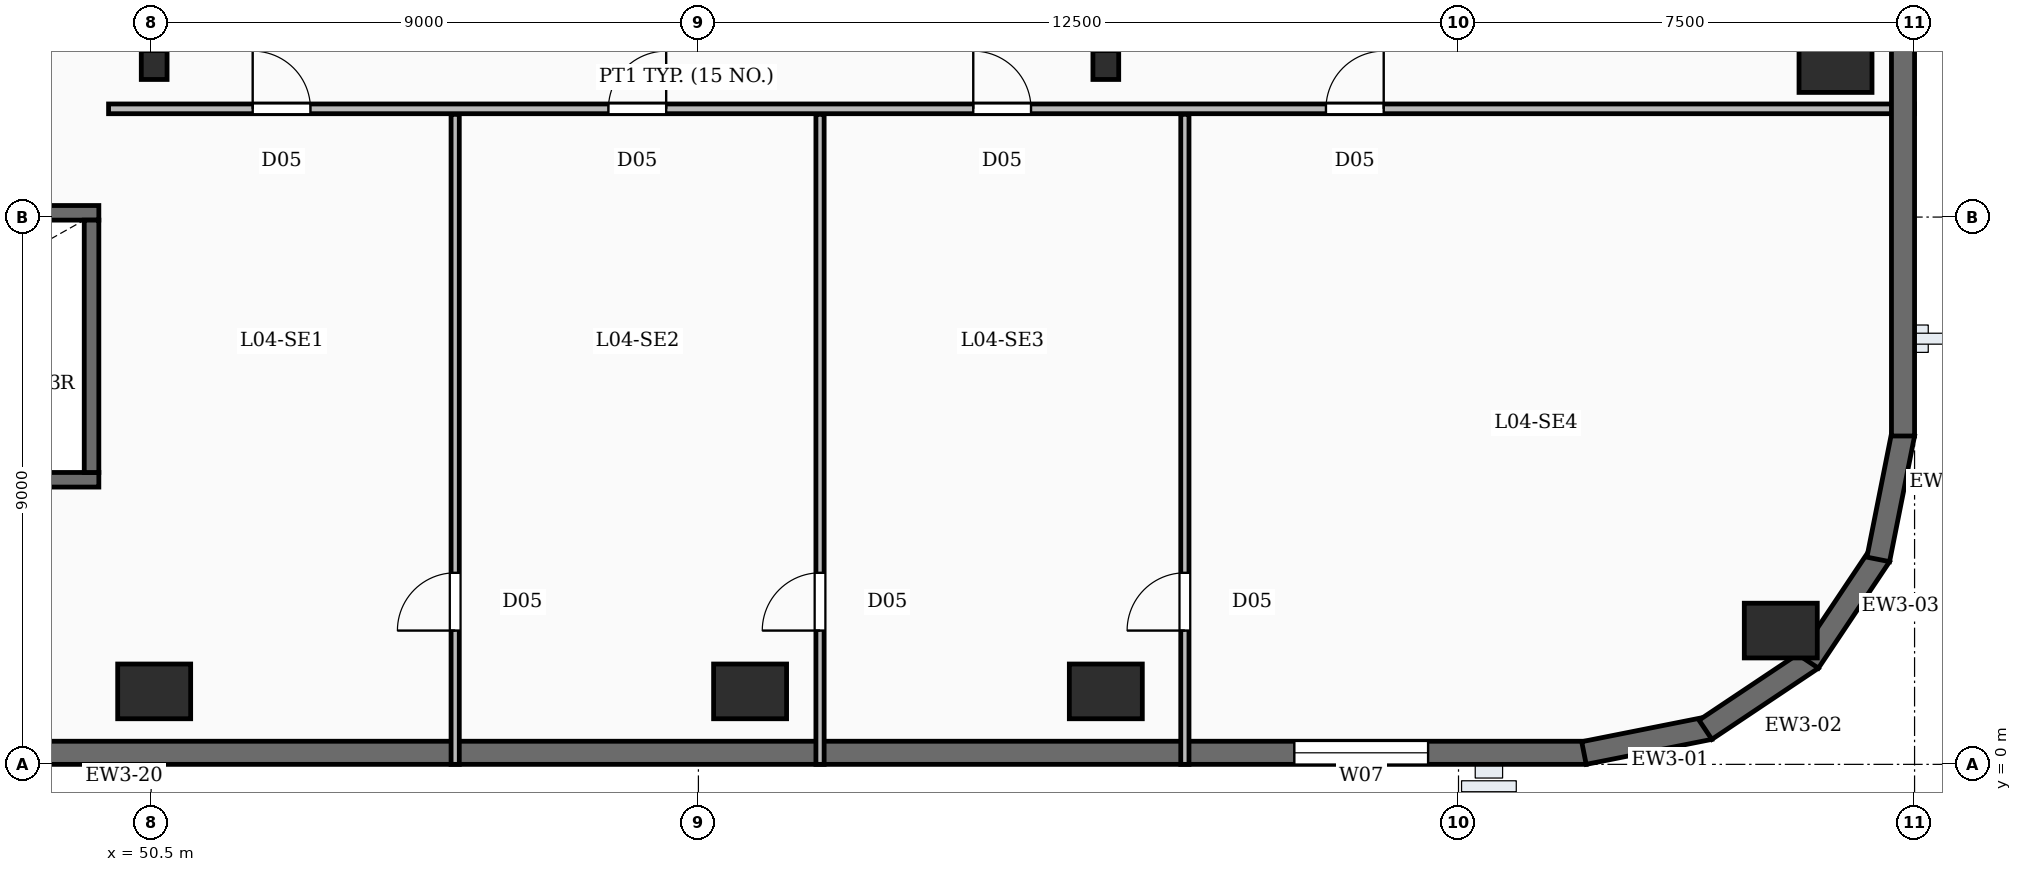
"""IFC4 building model, lengths in metres.
Left out: names, types, materials, properties, quantities, classifications, styles, units other than length and angle.
Written with IfcOpenShell. Run it as: python <this file> out.ifc"""

import sys

from ifc_helpers import new_model, si_unit, direction, frame, frame_2d, origin, origin_2d, place, context, subcontext, project, spatial, rectangle, i_section, extrude, element, fill, save


model = new_model("IFC4")
c1 = context("Model", 3, precision=1e-05, world=origin(), true_north=direction((0.0, 1.0)))
c2 = subcontext(c1, "Body", "Model", "MODEL_VIEW")
j1 = project(units=[si_unit("LENGTHUNIT", "METRE"), si_unit("PLANEANGLEUNIT", "RADIAN")], contexts=[c1])
p1 = place(None, origin())
s1 = spatial("IfcSite", under=j1, at=p1, CompositionType="ELEMENT")
p2 = place(p1, origin())
s2 = spatial("IfcBuilding", under=s1, at=p2, CompositionType="ELEMENT")
p3 = place(p2, frame((0.0, 0.0, 23.0)))
s3 = spatial("IfcBuildingStorey", under=s2, at=p3, CompositionType="ELEMENT", Elevation=23.0)
for number, where, z_axis, x_axis in (
    (1, (50.55, 1.2, -0.35), (0.0, 0.0, 1.0), (1.0, 0.0, 0.0)),
    (2, (60.35, 1.2, -0.35), (0.0, 0.0, 1.0), (1.0, 0.0, 0.0)),
    (3, (66.2, 1.2, -0.35), (0.0, 0.0, 1.0), (1.0, 0.0, 0.0)),
    (4, (77.3, 2.2, -0.35), (0.0, 0.0, 1.0), (1.0, 0.0, 0.0)),
    (5, (78.2, 11.5, -0.35), (0.0, 0.0, 1.0), (1.0, 0.0, 0.0)),
):
    element("IfcColumn", number, at=place(p3, frame(where, z_axis=z_axis, x_axis=x_axis)), inside=s3, PredefinedType="COLUMN", context=c2, shape_type="SweptSolid", body=[
        extrude(rectangle(XDim=1.2, YDim=0.9, at=origin_2d()), origin(), (0.0, 0.0, 1.0), 5.0),
    ])
for number, where, z_axis, x_axis in (
    (6, (50.55, 11.5, -0.35), (0.0, 0.0, 1.0), (1.0, 0.0, 0.0)),
    (7, (66.2, 11.5, -0.35), (0.0, 0.0, 1.0), (1.0, 0.0, 0.0)),
):
    element("IfcColumn", number, at=place(p3, frame(where, z_axis=z_axis, x_axis=x_axis)), inside=s3, PredefinedType="COLUMN", context=c2, shape_type="SweptSolid", body=[
        extrude(i_section(OverallWidth=0.424, OverallDepth=0.474, WebThickness=0.048, FlangeThickness=0.077, FilletRadius=0.02, at=origin_2d()), origin(), (0.0, 0.0, 1.0), 5.0),
    ])
for number, where, z_axis, x_axis in (
    (8, (76.129, 0.597, 0.0), (0.0, 0.0, 1.0), (-0.981, -0.195, 0.0)),
    (9, (77.813, 1.74, 0.0), (0.0, 0.0, 1.0), (-0.832, -0.556, 0.0)),
    (10, (78.931, 3.439, 0.0), (0.0, 0.0, 1.0), (-0.556, -0.832, 0.0)),
    (11, (79.314, 5.437, 0.0), (0.0, 0.0, 1.0), (-0.195, -0.981, 0.0)),
):
    element("IfcWall", number, at=place(p3, frame(where, z_axis=z_axis, x_axis=x_axis)), inside=s3, PredefinedType="SOLIDWALL", context=c2, shape_type="SweptSolid", body=[
        extrude(rectangle(XDim=2.107, YDim=0.38, at=frame_2d((1.053, 0.0))), origin(), (0.0, 0.0, 1.0), 4.65),
    ])
p4 = place(p3, frame((79.31, 49.1, 0.0), z_axis=(0.0, 0.0, 1.0), x_axis=(0.0, -1.0, 0.0)))
e12 = element("IfcWall", 12, at=p4, inside=s3, PredefinedType="SOLIDWALL", context=c2, shape_type="SweptSolid", body=[
    extrude(rectangle(XDim=43.7, YDim=0.38, at=frame_2d((21.85, 0.0))), origin(), (0.0, 0.0, 1.0), 4.65),
])
p5 = place(p4, frame((2.6, 0.0, 0.95)))
e13 = element("IfcOpeningElement", 13, at=p5, cuts=e12, PredefinedType="OPENING", context=c2, shape_type="SweptSolid", body=[
    extrude(rectangle(XDim=2.2, YDim=2.5, at=frame_2d((1.1, 1.25))), frame((0.0, 0.2, 0.0), z_axis=(0.0, -1.0, 0.0), x_axis=(1.0, 0.0, 0.0)), (0.0, 0.0, 1.0), 0.4),
])
p6 = place(p4, frame((8.0, 0.0, 0.95)))
e14 = element("IfcOpeningElement", 14, at=p6, cuts=e12, PredefinedType="OPENING", context=c2, shape_type="SweptSolid", body=[
    extrude(rectangle(XDim=2.2, YDim=2.5, at=frame_2d((1.1, 1.25))), frame((0.0, 0.2, 0.0), z_axis=(0.0, -1.0, 0.0), x_axis=(1.0, 0.0, 0.0)), (0.0, 0.0, 1.0), 0.4),
])
p7 = place(p4, frame((18.8, 0.0, 0.95)))
e15 = element("IfcOpeningElement", 15, at=p7, cuts=e12, PredefinedType="OPENING", context=c2, shape_type="SweptSolid", body=[
    extrude(rectangle(XDim=2.2, YDim=2.5, at=frame_2d((1.1, 1.25))), frame((0.0, 0.2, 0.0), z_axis=(0.0, -1.0, 0.0), x_axis=(1.0, 0.0, 0.0)), (0.0, 0.0, 1.0), 0.4),
])
p8 = place(p4, frame((24.2, 0.0, 0.95)))
e16 = element("IfcOpeningElement", 16, at=p8, cuts=e12, PredefinedType="OPENING", context=c2, shape_type="SweptSolid", body=[
    extrude(rectangle(XDim=2.2, YDim=2.5, at=frame_2d((1.1, 1.25))), frame((0.0, 0.2, 0.0), z_axis=(0.0, -1.0, 0.0), x_axis=(1.0, 0.0, 0.0)), (0.0, 0.0, 1.0), 0.4),
])
p9 = place(p4, frame((29.6, 0.0, 0.95)))
e17 = element("IfcOpeningElement", 17, at=p9, cuts=e12, PredefinedType="OPENING", context=c2, shape_type="SweptSolid", body=[
    extrude(rectangle(XDim=2.2, YDim=2.5, at=frame_2d((1.1, 1.25))), frame((0.0, 0.2, 0.0), z_axis=(0.0, -1.0, 0.0), x_axis=(1.0, 0.0, 0.0)), (0.0, 0.0, 1.0), 0.4),
])
p10 = place(p3, frame((74.1, 0.19, 0.0), z_axis=(0.0, 0.0, 1.0), x_axis=(-1.0, 0.0, 0.0)))
e18 = element("IfcWall", 18, at=p10, inside=s3, PredefinedType="SOLIDWALL", context=c2, shape_type="SweptSolid", body=[
    extrude(rectangle(XDim=68.7, YDim=0.38, at=frame_2d((34.35, 0.0))), origin(), (0.0, 0.0, 1.0), 4.65),
])
p11 = place(p10, frame((2.6, 0.0, 0.95)))
e19 = element("IfcOpeningElement", 19, at=p11, cuts=e18, PredefinedType="OPENING", context=c2, shape_type="SweptSolid", body=[
    extrude(rectangle(XDim=2.2, YDim=2.5, at=frame_2d((1.1, 1.25))), frame((0.0, 0.2, 0.0), z_axis=(0.0, -1.0, 0.0), x_axis=(1.0, 0.0, 0.0)), (0.0, 0.0, 1.0), 0.4),
])
p12 = place(p10, frame((29.6, 0.0, 0.95)))
e20 = element("IfcOpeningElement", 20, at=p12, cuts=e18, PredefinedType="OPENING", context=c2, shape_type="SweptSolid", body=[
    extrude(rectangle(XDim=2.2, YDim=2.5, at=frame_2d((1.1, 1.25))), frame((0.0, 0.2, 0.0), z_axis=(0.0, -1.0, 0.0), x_axis=(1.0, 0.0, 0.0)), (0.0, 0.0, 1.0), 0.4),
])
p13 = place(p10, frame((40.4, 0.0, 0.95)))
e21 = element("IfcOpeningElement", 21, at=p13, cuts=e18, PredefinedType="OPENING", context=c2, shape_type="SweptSolid", body=[
    extrude(rectangle(XDim=2.2, YDim=2.5, at=frame_2d((1.1, 1.25))), frame((0.0, 0.2, 0.0), z_axis=(0.0, -1.0, 0.0), x_axis=(1.0, 0.0, 0.0)), (0.0, 0.0, 1.0), 0.4),
])
p14 = place(p10, frame((45.8, 0.0, 0.95)))
e22 = element("IfcOpeningElement", 22, at=p14, cuts=e18, PredefinedType="OPENING", context=c2, shape_type="SweptSolid", body=[
    extrude(rectangle(XDim=2.2, YDim=2.5, at=frame_2d((1.1, 1.25))), frame((0.0, 0.2, 0.0), z_axis=(0.0, -1.0, 0.0), x_axis=(1.0, 0.0, 0.0)), (0.0, 0.0, 1.0), 0.4),
])
p15 = place(p10, frame((51.2, 0.0, 0.95)))
e23 = element("IfcOpeningElement", 23, at=p15, cuts=e18, PredefinedType="OPENING", context=c2, shape_type="SweptSolid", body=[
    extrude(rectangle(XDim=2.2, YDim=2.5, at=frame_2d((1.1, 1.25))), frame((0.0, 0.2, 0.0), z_axis=(0.0, -1.0, 0.0), x_axis=(1.0, 0.0, 0.0)), (0.0, 0.0, 1.0), 0.4),
])
p16 = place(p10, frame((56.6, 0.0, 0.95)))
e24 = element("IfcOpeningElement", 24, at=p16, cuts=e18, PredefinedType="OPENING", context=c2, shape_type="SweptSolid", body=[
    extrude(rectangle(XDim=2.2, YDim=2.5, at=frame_2d((1.1, 1.25))), frame((0.0, 0.2, 0.0), z_axis=(0.0, -1.0, 0.0), x_axis=(1.0, 0.0, 0.0)), (0.0, 0.0, 1.0), 0.4),
])
p17 = place(p10, frame((62.0, 0.0, 0.95)))
e25 = element("IfcOpeningElement", 25, at=p17, cuts=e18, PredefinedType="OPENING", context=c2, shape_type="SweptSolid", body=[
    extrude(rectangle(XDim=2.2, YDim=2.5, at=frame_2d((1.1, 1.25))), frame((0.0, 0.2, 0.0), z_axis=(0.0, -1.0, 0.0), x_axis=(1.0, 0.0, 0.0)), (0.0, 0.0, 1.0), 0.4),
])
p18 = place(p3, frame((39.76, 9.07, 0.0), z_axis=(0.0, 0.0, 1.0), x_axis=(1.0, 0.0, 0.0)))
e26 = element("IfcWall", 26, at=p18, inside=s3, PredefinedType="SOLIDWALL", context=c2, shape_type="SweptSolid", body=[
    extrude(rectangle(XDim=9.88, YDim=0.24, at=frame_2d((4.94, 0.0))), origin(), (0.0, 0.0, 1.0), 4.65),
])
p19 = place(p18, frame((0.69, 0.0, 0.0)))
e27 = element("IfcOpeningElement", 27, at=p19, cuts=e26, PredefinedType="OPENING", context=c2, shape_type="SweptSolid", body=[
    extrude(rectangle(XDim=1.1, YDim=2.15, at=frame_2d((0.55, 1.075))), frame((0.0, 0.13, 0.0), z_axis=(0.0, -1.0, 0.0), x_axis=(1.0, 0.0, 0.0)), (0.0, 0.0, 1.0), 0.26),
])
p20 = place(p3, frame((39.76, 4.68, 0.0), z_axis=(0.0, 0.0, 1.0), x_axis=(1.0, 0.0, 0.0)))
e28 = element("IfcWall", 28, at=p20, inside=s3, PredefinedType="SOLIDWALL", context=c2, shape_type="SweptSolid", body=[
    extrude(rectangle(XDim=9.88, YDim=0.24, at=frame_2d((4.94, 0.0))), origin(), (0.0, 0.0, 1.0), 4.65),
])
p21 = place(p3, frame((49.52, 4.8, 0.0), z_axis=(0.0, 0.0, 1.0), x_axis=(0.0, 1.0, 0.0)))
e29 = element("IfcWall", 29, at=p21, inside=s3, PredefinedType="SOLIDWALL", context=c2, shape_type="SweptSolid", body=[
    extrude(rectangle(XDim=4.15, YDim=0.24, at=frame_2d((2.075, 0.0))), origin(), (0.0, 0.0, 1.0), 4.65),
])
p22 = place(p3, frame((55.5, 0.0, 0.0), z_axis=(0.0, 0.0, 1.0), x_axis=(0.0, 1.0, 0.0)))
e30 = element("IfcWall", 30, at=p22, inside=s3, PredefinedType="PARTITIONING", context=c2, shape_type="SweptSolid", body=[
    extrude(rectangle(XDim=10.69, YDim=0.135, at=frame_2d((5.345, 0.0))), origin(), (0.0, 0.0, 1.0), 3.71),
])
p23 = place(p22, frame((2.2, 0.0, 0.0)))
e31 = element("IfcOpeningElement", 31, at=p23, cuts=e30, PredefinedType="OPENING", context=c2, shape_type="SweptSolid", body=[
    extrude(rectangle(XDim=0.95, YDim=2.15, at=frame_2d((0.475, 1.075))), frame((0.0, 0.077, 0.0), z_axis=(0.0, -1.0, 0.0), x_axis=(1.0, 0.0, 0.0)), (0.0, 0.0, 1.0), 0.155),
])
p24 = place(p3, frame((61.5, 0.0, 0.0), z_axis=(0.0, 0.0, 1.0), x_axis=(0.0, 1.0, 0.0)))
e32 = element("IfcWall", 32, at=p24, inside=s3, PredefinedType="PARTITIONING", context=c2, shape_type="SweptSolid", body=[
    extrude(rectangle(XDim=10.69, YDim=0.135, at=frame_2d((5.345, 0.0))), origin(), (0.0, 0.0, 1.0), 3.71),
])
p25 = place(p24, frame((2.2, 0.0, 0.0)))
e33 = element("IfcOpeningElement", 33, at=p25, cuts=e32, PredefinedType="OPENING", context=c2, shape_type="SweptSolid", body=[
    extrude(rectangle(XDim=0.95, YDim=2.15, at=frame_2d((0.475, 1.075))), frame((0.0, 0.077, 0.0), z_axis=(0.0, -1.0, 0.0), x_axis=(1.0, 0.0, 0.0)), (0.0, 0.0, 1.0), 0.155),
])
p26 = place(p3, frame((67.5, 0.0, 0.0), z_axis=(0.0, 0.0, 1.0), x_axis=(0.0, 1.0, 0.0)))
e34 = element("IfcWall", 34, at=p26, inside=s3, PredefinedType="PARTITIONING", context=c2, shape_type="SweptSolid", body=[
    extrude(rectangle(XDim=10.69, YDim=0.135, at=frame_2d((5.345, 0.0))), origin(), (0.0, 0.0, 1.0), 3.71),
])
p27 = place(p26, frame((2.2, 0.0, 0.0)))
e35 = element("IfcOpeningElement", 35, at=p27, cuts=e34, PredefinedType="OPENING", context=c2, shape_type="SweptSolid", body=[
    extrude(rectangle(XDim=0.95, YDim=2.15, at=frame_2d((0.475, 1.075))), frame((0.0, 0.077, 0.0), z_axis=(0.0, -1.0, 0.0), x_axis=(1.0, 0.0, 0.0)), (0.0, 0.0, 1.0), 0.155),
])
p28 = place(p3, frame((49.8, 10.78, 0.0), z_axis=(0.0, 0.0, 1.0), x_axis=(1.0, 0.0, 0.0)))
e36 = element("IfcWall", 36, at=p28, inside=s3, PredefinedType="PARTITIONING", context=c2, shape_type="SweptSolid", body=[
    extrude(rectangle(XDim=29.7, YDim=0.16, at=frame_2d((14.85, 0.0))), origin(), (0.0, 0.0, 1.0), 3.71),
])
p29 = place(p28, frame((2.37, 0.0, 0.0)))
e37 = element("IfcOpeningElement", 37, at=p29, cuts=e36, PredefinedType="OPENING", context=c2, shape_type="SweptSolid", body=[
    extrude(rectangle(XDim=0.95, YDim=2.15, at=frame_2d((0.475, 1.075))), frame((0.0, 0.09, 0.0), z_axis=(0.0, -1.0, 0.0), x_axis=(1.0, 0.0, 0.0)), (0.0, 0.0, 1.0), 0.18),
])
p30 = place(p28, frame((8.22, 0.0, 0.0)))
e38 = element("IfcOpeningElement", 38, at=p30, cuts=e36, PredefinedType="OPENING", context=c2, shape_type="SweptSolid", body=[
    extrude(rectangle(XDim=0.95, YDim=2.15, at=frame_2d((0.475, 1.075))), frame((0.0, 0.09, 0.0), z_axis=(0.0, -1.0, 0.0), x_axis=(1.0, 0.0, 0.0)), (0.0, 0.0, 1.0), 0.18),
])
p31 = place(p28, frame((14.22, 0.0, 0.0)))
e39 = element("IfcOpeningElement", 39, at=p31, cuts=e36, PredefinedType="OPENING", context=c2, shape_type="SweptSolid", body=[
    extrude(rectangle(XDim=0.95, YDim=2.15, at=frame_2d((0.475, 1.075))), frame((0.0, 0.09, 0.0), z_axis=(0.0, -1.0, 0.0), x_axis=(1.0, 0.0, 0.0)), (0.0, 0.0, 1.0), 0.18),
])
p32 = place(p28, frame((20.02, 0.0, 0.0)))
e40 = element("IfcOpeningElement", 40, at=p32, cuts=e36, PredefinedType="OPENING", context=c2, shape_type="SweptSolid", body=[
    extrude(rectangle(XDim=0.95, YDim=2.15, at=frame_2d((0.475, 1.075))), frame((0.0, 0.09, 0.0), z_axis=(0.0, -1.0, 0.0), x_axis=(1.0, 0.0, 0.0)), (0.0, 0.0, 1.0), 0.18),
])
p33 = place(p11, origin())
e41 = element("IfcWindow", 41, at=p33, inside=s3, PartitioningType="DOUBLE_PANEL_VERTICAL", PredefinedType="WINDOW", context=c2, shape_type="SweptSolid", body=[
    extrude(rectangle(XDim=2.2, YDim=2.5, at=frame_2d((1.1, 1.25))), frame((0.0, 0.03, 0.0), z_axis=(0.0, -1.0, 0.0), x_axis=(1.0, 0.0, 0.0)), (0.0, 0.0, 1.0), 0.06),
])
fill(e19, e41)
p34 = place(p23, origin())
e42 = element("IfcDoor", 42, at=p34, inside=s3, OperationType="SINGLE_SWING_LEFT", PredefinedType="DOOR", context=c2, shape_type="SweptSolid", body=[
    extrude(rectangle(XDim=0.95, YDim=2.15, at=frame_2d((0.475, 1.075))), frame((0.0, 0.025, 0.0), z_axis=(0.0, -1.0, 0.0), x_axis=(1.0, 0.0, 0.0)), (0.0, 0.0, 1.0), 0.05),
])
fill(e31, e42)
p35 = place(p25, origin())
e43 = element("IfcDoor", 43, at=p35, inside=s3, OperationType="SINGLE_SWING_LEFT", PredefinedType="DOOR", context=c2, shape_type="SweptSolid", body=[
    extrude(rectangle(XDim=0.95, YDim=2.15, at=frame_2d((0.475, 1.075))), frame((0.0, 0.025, 0.0), z_axis=(0.0, -1.0, 0.0), x_axis=(1.0, 0.0, 0.0)), (0.0, 0.0, 1.0), 0.05),
])
fill(e33, e43)
p36 = place(p27, origin())
e44 = element("IfcDoor", 44, at=p36, inside=s3, OperationType="SINGLE_SWING_LEFT", PredefinedType="DOOR", context=c2, shape_type="SweptSolid", body=[
    extrude(rectangle(XDim=0.95, YDim=2.15, at=frame_2d((0.475, 1.075))), frame((0.0, 0.025, 0.0), z_axis=(0.0, -1.0, 0.0), x_axis=(1.0, 0.0, 0.0)), (0.0, 0.0, 1.0), 0.05),
])
fill(e35, e44)
p37 = place(p29, origin())
e45 = element("IfcDoor", 45, at=p37, inside=s3, OperationType="SINGLE_SWING_LEFT", PredefinedType="DOOR", context=c2, shape_type="SweptSolid", body=[
    extrude(rectangle(XDim=0.95, YDim=2.15, at=frame_2d((0.475, 1.075))), frame((0.0, 0.025, 0.0), z_axis=(0.0, -1.0, 0.0), x_axis=(1.0, 0.0, 0.0)), (0.0, 0.0, 1.0), 0.05),
])
fill(e37, e45)
p38 = place(p30, origin())
e46 = element("IfcDoor", 46, at=p38, inside=s3, OperationType="SINGLE_SWING_RIGHT", PredefinedType="DOOR", context=c2, shape_type="SweptSolid", body=[
    extrude(rectangle(XDim=0.95, YDim=2.15, at=frame_2d((0.475, 1.075))), frame((0.0, 0.025, 0.0), z_axis=(0.0, -1.0, 0.0), x_axis=(1.0, 0.0, 0.0)), (0.0, 0.0, 1.0), 0.05),
])
fill(e38, e46)
p39 = place(p31, origin())
e47 = element("IfcDoor", 47, at=p39, inside=s3, OperationType="SINGLE_SWING_LEFT", PredefinedType="DOOR", context=c2, shape_type="SweptSolid", body=[
    extrude(rectangle(XDim=0.95, YDim=2.15, at=frame_2d((0.475, 1.075))), frame((0.0, 0.025, 0.0), z_axis=(0.0, -1.0, 0.0), x_axis=(1.0, 0.0, 0.0)), (0.0, 0.0, 1.0), 0.05),
])
fill(e39, e47)
p40 = place(p32, origin())
e48 = element("IfcDoor", 48, at=p40, inside=s3, OperationType="SINGLE_SWING_RIGHT", PredefinedType="DOOR", context=c2, shape_type="SweptSolid", body=[
    extrude(rectangle(XDim=0.95, YDim=2.15, at=frame_2d((0.475, 1.075))), frame((0.0, 0.025, 0.0), z_axis=(0.0, -1.0, 0.0), x_axis=(1.0, 0.0, 0.0)), (0.0, 0.0, 1.0), 0.05),
])
fill(e40, e48)
save(model, sys.argv[1])
